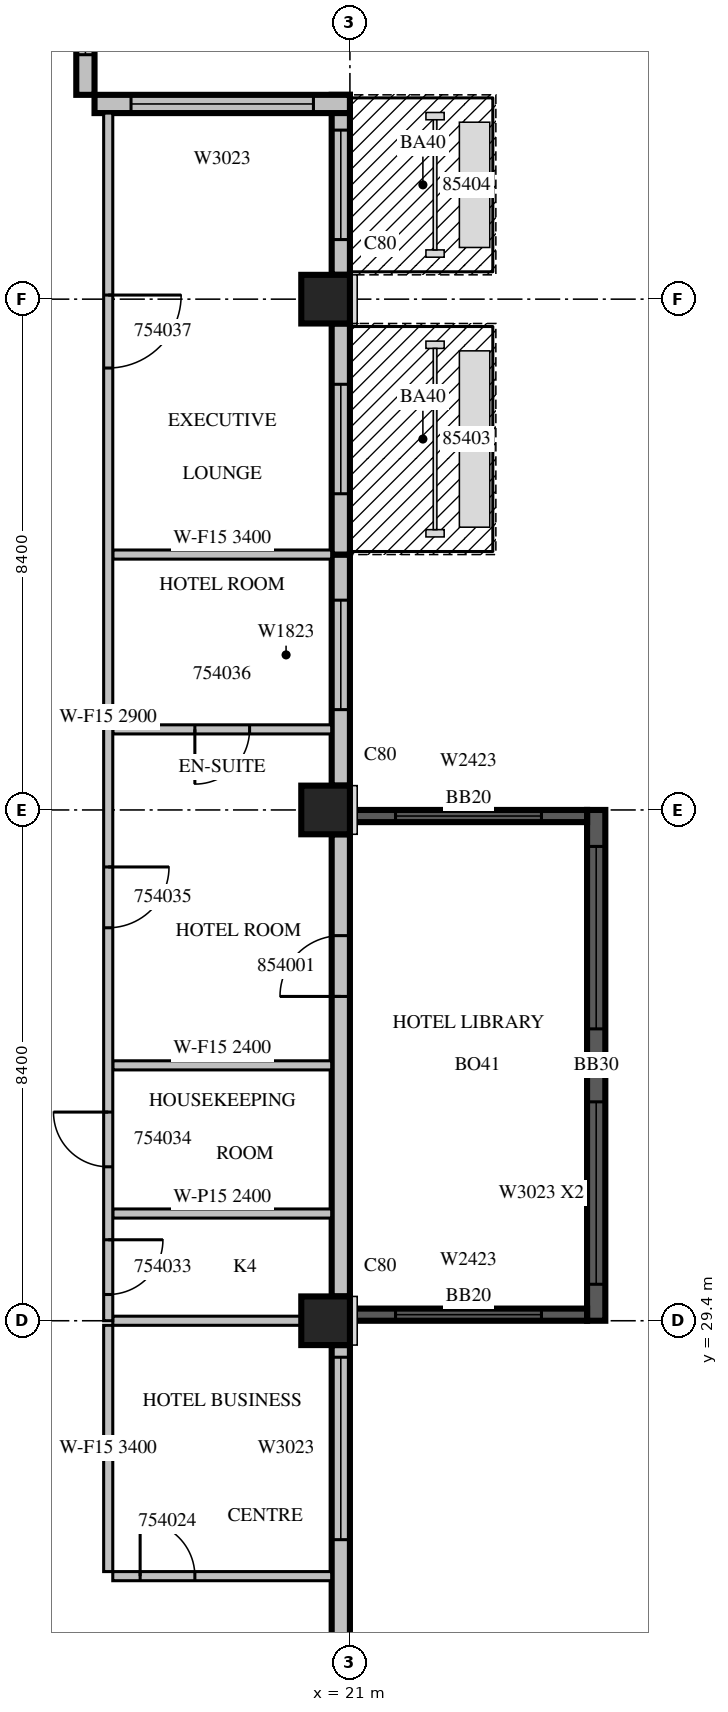
"""IFC4 building model, lengths in metres.
Left out: names, types, materials, properties, quantities, classifications, styles, units other than length and angle.
Written with IfcOpenShell. Run it as: python <this file> out.ifc"""

import sys

from ifc_helpers import new_model, si_unit, direction, frame, frame_2d, origin, origin_2d, place, context, subcontext, project, spatial, rectangle, extrude, source, transform, mapped, element, fill, save


model = new_model("IFC4")
c1 = context("Model", 3, precision=1e-05, world=origin(), true_north=direction((0.0, 1.0)))
c2 = subcontext(c1, "Body", "Model", "MODEL_VIEW")
j1 = project(units=[si_unit("LENGTHUNIT", "METRE"), si_unit("PLANEANGLEUNIT", "RADIAN")], contexts=[c1])
p1 = place(None, origin())
s1 = spatial("IfcSite", under=j1, at=p1, CompositionType="ELEMENT")
p2 = place(p1, origin())
s2 = spatial("IfcBuilding", under=s1, at=p2, CompositionType="ELEMENT")
p3 = place(p2, frame((0.0, 0.0, 238.6)))
s3 = spatial("IfcBuildingStorey", under=s2, at=p3, CompositionType="ELEMENT", Elevation=238.6)
m1 = source(origin(), c2, "Body", "SweptSolid", [
    extrude(rectangle(XDim=0.8, YDim=0.8, at=origin_2d()), origin(), (0.0, 0.0, 1.0), 3.8),
])
for number, where, z_axis, x_axis in (
    (1, (20.6, 29.4, 0.0), (0.0, 0.0, 1.0), (1.0, 0.0, 0.0)),
    (2, (20.6, 37.8, 0.0), (0.0, 0.0, 1.0), (1.0, 0.0, 0.0)),
    (3, (20.6, 46.2, 0.0), (0.0, 0.0, 1.0), (1.0, 0.0, 0.0)),
):
    element("IfcColumn", number, at=place(p3, frame(where, z_axis=z_axis, x_axis=x_axis)), inside=s3, PredefinedType="COLUMN", context=c2, shape_type="MappedRepresentation", body=[
        mapped(m1, transform((0.0, 0.0, 0.0), scale=1.0)),
    ])
m2 = source(origin(), c2, "Body", "SweptSolid", [
    extrude(rectangle(XDim=7.2, YDim=0.3, at=frame_2d((3.6, 0.0))), origin(), (0.0, 0.0, 1.0), 3.4),
])
p4 = place(p3, frame((20.85, 21.8, 0.0), z_axis=(0.0, 0.0, 1.0), x_axis=(0.0, 1.0, 0.0)))
e4 = element("IfcWall", 4, at=p4, inside=s3, PredefinedType="STANDARD", context=c2, shape_type="MappedRepresentation", body=[
    mapped(m2, transform((0.0, 0.0, 0.0), scale=1.0)),
])
m3 = source(origin(), c2, "Body", "SweptSolid", [
    extrude(rectangle(XDim=1.8, YDim=2.3, at=frame_2d((0.9, 1.15))), frame((0.0, 0.16, 0.0), z_axis=(0.0, -1.0, 0.0), x_axis=(1.0, 0.0, 0.0)), (0.0, 0.0, 1.0), 0.32),
])
p5 = place(p4, frame((0.4, 0.0, 0.6)))
e5 = element("IfcOpeningElement", 5, at=p5, cuts=e4, PredefinedType="OPENING", context=c2, shape_type="MappedRepresentation", body=[
    mapped(m3, transform((0.0, 0.0, 0.0), scale=1.0)),
])
m4 = source(origin(), c2, "Body", "SweptSolid", [
    extrude(rectangle(XDim=3.0, YDim=2.3, at=frame_2d((1.5, 1.15))), frame((0.0, 0.16, 0.0), z_axis=(0.0, -1.0, 0.0), x_axis=(1.0, 0.0, 0.0)), (0.0, 0.0, 1.0), 0.32),
])
p6 = place(p4, frame((4.0, 0.0, 0.6)))
e6 = element("IfcOpeningElement", 6, at=p6, cuts=e4, PredefinedType="OPENING", context=c2, shape_type="MappedRepresentation", body=[
    mapped(m4, transform((0.0, 0.0, 0.0), scale=1.0)),
])
m5 = source(origin(), c2, "Body", "SweptSolid", [
    extrude(rectangle(XDim=7.6, YDim=0.3, at=frame_2d((3.8, 0.0))), origin(), (0.0, 0.0, 1.0), 3.4),
])
p7 = place(p3, frame((20.85, 29.8, 0.0), z_axis=(0.0, 0.0, 1.0), x_axis=(0.0, 1.0, 0.0)))
e7 = element("IfcWall", 7, at=p7, inside=s3, PredefinedType="STANDARD", context=c2, shape_type="MappedRepresentation", body=[
    mapped(m5, transform((0.0, 0.0, 0.0), scale=1.0)),
])
m6 = source(origin(), c2, "Body", "SweptSolid", [
    extrude(rectangle(XDim=1.0, YDim=2.1, at=frame_2d((0.5, 1.05))), frame((0.0, 0.16, 0.0), z_axis=(0.0, -1.0, 0.0), x_axis=(1.0, 0.0, 0.0)), (0.0, 0.0, 1.0), 0.32),
])
p8 = place(p7, frame((4.933, 0.0, 0.0)))
e8 = element("IfcOpeningElement", 8, at=p8, cuts=e7, PredefinedType="OPENING", context=c2, shape_type="MappedRepresentation", body=[
    mapped(m6, transform((0.0, 0.0, 0.0), scale=1.0)),
])
p9 = place(p3, frame((20.85, 38.2, 0.0), z_axis=(0.0, 0.0, 1.0), x_axis=(0.0, 1.0, 0.0)))
e9 = element("IfcWall", 9, at=p9, inside=s3, PredefinedType="STANDARD", context=c2, shape_type="SweptSolid", body=[
    extrude(rectangle(XDim=3.8, YDim=0.3, at=frame_2d((1.9, 0.0))), origin(), (0.0, 0.0, 1.0), 3.4),
])
p10 = place(p9, frame((1.25, 0.0, 0.6)))
e10 = element("IfcOpeningElement", 10, at=p10, cuts=e9, PredefinedType="OPENING", context=c2, shape_type="MappedRepresentation", body=[
    mapped(m3, transform((0.0, 0.0, 0.0), scale=1.0)),
])
m7 = source(origin(), c2, "Body", "SweptSolid", [
    extrude(rectangle(XDim=3.8, YDim=0.3, at=frame_2d((1.9, 0.0))), origin(), (0.0, 0.0, 1.0), 3.4),
])
p11 = place(p3, frame((20.85, 42.0, 0.0), z_axis=(0.0, 0.0, 1.0), x_axis=(0.0, 1.0, 0.0)))
e11 = element("IfcWall", 11, at=p11, inside=s3, PredefinedType="STANDARD", context=c2, shape_type="MappedRepresentation", body=[
    mapped(m7, transform((0.0, 0.0, 0.0), scale=1.0)),
])
m8 = source(origin(), c2, "Body", "SweptSolid", [
    extrude(rectangle(XDim=1.8, YDim=2.4, at=frame_2d((0.9, 1.2))), frame((0.0, 0.16, 0.0), z_axis=(0.0, -1.0, 0.0), x_axis=(1.0, 0.0, 0.0)), (0.0, 0.0, 1.0), 0.32),
])
p12 = place(p11, frame((1.0, 0.0, 0.0)))
e12 = element("IfcOpeningElement", 12, at=p12, cuts=e11, PredefinedType="OPENING", context=c2, shape_type="MappedRepresentation", body=[
    mapped(m8, transform((0.0, 0.0, 0.0), scale=1.0)),
])
m9 = source(origin(), c2, "Body", "SweptSolid", [
    extrude(rectangle(XDim=2.96, YDim=0.3, at=frame_2d((1.48, 0.0))), origin(), (0.0, 0.0, 1.0), 3.4),
])
p13 = place(p3, frame((20.85, 46.6, 0.0), z_axis=(0.0, 0.0, 1.0), x_axis=(0.0, 1.0, 0.0)))
e13 = element("IfcWall", 13, at=p13, inside=s3, PredefinedType="STANDARD", context=c2, shape_type="MappedRepresentation", body=[
    mapped(m9, transform((0.0, 0.0, 0.0), scale=1.0)),
])
p14 = place(p13, frame((0.58, 0.0, 0.0)))
e14 = element("IfcOpeningElement", 14, at=p14, cuts=e13, PredefinedType="OPENING", context=c2, shape_type="MappedRepresentation", body=[
    mapped(m8, transform((0.0, 0.0, 0.0), scale=1.0)),
])
m10 = source(origin(), c2, "Body", "SweptSolid", [
    extrude(rectangle(XDim=4.2, YDim=0.3, at=frame_2d((2.1, 0.0))), origin(), (0.0, 0.0, 1.0), 3.4),
])
p15 = place(p3, frame((21.0, 49.41, 0.0), z_axis=(0.0, 0.0, 1.0), x_axis=(-1.0, 0.0, 0.0)))
e15 = element("IfcWall", 15, at=p15, inside=s3, PredefinedType="STANDARD", context=c2, shape_type="MappedRepresentation", body=[
    mapped(m10, transform((0.0, 0.0, 0.0), scale=1.0)),
])
p16 = place(p15, frame((0.6, 0.0, 0.6)))
e16 = element("IfcOpeningElement", 16, at=p16, cuts=e15, PredefinedType="OPENING", context=c2, shape_type="MappedRepresentation", body=[
    mapped(m4, transform((0.0, 0.0, 0.0), scale=1.0)),
])
m11 = source(origin(), c2, "Body", "SweptSolid", [
    extrude(rectangle(XDim=2.52, YDim=0.3, at=frame_2d((1.26, 0.0))), origin(), (0.0, 0.0, 1.0), 3.4),
])
p17 = place(p3, frame((16.65, 49.56, 0.0), z_axis=(0.0, 0.0, 1.0), x_axis=(0.0, 1.0, 0.0)))
e17 = element("IfcWall", 17, at=p17, inside=s3, PredefinedType="STANDARD", context=c2, shape_type="MappedRepresentation", body=[
    mapped(m11, transform((0.0, 0.0, 0.0), scale=1.0)),
])
m12 = source(origin(), c2, "Body", "SweptSolid", [
    extrude(rectangle(XDim=1.2, YDim=2.3, at=frame_2d((0.6, 1.15))), frame((0.0, 0.16, 0.0), z_axis=(0.0, -1.0, 0.0), x_axis=(1.0, 0.0, 0.0)), (0.0, 0.0, 1.0), 0.32),
])
p18 = place(p17, frame((0.66, 0.0, 0.6)))
e18 = element("IfcOpeningElement", 18, at=p18, cuts=e17, PredefinedType="OPENING", context=c2, shape_type="MappedRepresentation", body=[
    mapped(m12, transform((0.0, 0.0, 0.0), scale=1.0)),
])
m13 = source(origin(), c2, "Body", "SweptSolid", [
    extrude(rectangle(XDim=8.4, YDim=0.3, at=frame_2d((4.2, 0.0))), origin(), (0.0, 0.0, 1.0), 3.39),
])
p19 = place(p3, frame((25.05, 29.4, 0.0), z_axis=(0.0, 0.0, 1.0), x_axis=(0.0, 1.0, 0.0)))
e19 = element("IfcWall", 19, at=p19, inside=s3, PredefinedType="SOLIDWALL", context=c2, shape_type="MappedRepresentation", body=[
    mapped(m13, transform((0.0, 0.0, 0.0), scale=1.0)),
])
p20 = place(p19, frame((0.6, 0.0, 0.6)))
e20 = element("IfcOpeningElement", 20, at=p20, cuts=e19, PredefinedType="OPENING", context=c2, shape_type="MappedRepresentation", body=[
    mapped(m4, transform((0.0, 0.0, 0.0), scale=1.0)),
])
p21 = place(p19, frame((4.8, 0.0, 0.6)))
e21 = element("IfcOpeningElement", 21, at=p21, cuts=e19, PredefinedType="OPENING", context=c2, shape_type="MappedRepresentation", body=[
    mapped(m4, transform((0.0, 0.0, 0.0), scale=1.0)),
])
m14 = source(origin(), c2, "Body", "SweptSolid", [
    extrude(rectangle(XDim=3.9, YDim=0.2, at=frame_2d((1.95, 0.0))), origin(), (0.0, 0.0, 1.0), 3.39),
])
p22 = place(p3, frame((21.0, 29.5, 0.0), z_axis=(0.0, 0.0, 1.0), x_axis=(1.0, 0.0, 0.0)))
e22 = element("IfcWall", 22, at=p22, inside=s3, PredefinedType="SOLIDWALL", context=c2, shape_type="MappedRepresentation", body=[
    mapped(m14, transform((0.0, 0.0, 0.0), scale=1.0)),
])
m15 = source(origin(), c2, "Body", "SweptSolid", [
    extrude(rectangle(XDim=2.4, YDim=2.3, at=frame_2d((1.2, 1.15))), frame((0.0, 0.11, 0.0), z_axis=(0.0, -1.0, 0.0), x_axis=(1.0, 0.0, 0.0)), (0.0, 0.0, 1.0), 0.22),
])
p23 = place(p22, frame((0.75, 0.0, 0.6)))
e23 = element("IfcOpeningElement", 23, at=p23, cuts=e22, PredefinedType="OPENING", context=c2, shape_type="MappedRepresentation", body=[
    mapped(m15, transform((0.0, 0.0, 0.0), scale=1.0)),
])
p24 = place(p3, frame((21.0, 37.7, 0.0), z_axis=(0.0, 0.0, 1.0), x_axis=(1.0, 0.0, 0.0)))
e24 = element("IfcWall", 24, at=p24, inside=s3, PredefinedType="SOLIDWALL", context=c2, shape_type="MappedRepresentation", body=[
    mapped(m14, transform((0.0, 0.0, 0.0), scale=1.0)),
])
p25 = place(p24, frame((0.75, 0.0, 0.6)))
e25 = element("IfcOpeningElement", 25, at=p25, cuts=e24, PredefinedType="OPENING", context=c2, shape_type="MappedRepresentation", body=[
    mapped(m15, transform((0.0, 0.0, 0.0), scale=1.0)),
])
m16 = source(origin(), c2, "Body", "SweptSolid", [
    extrude(rectangle(XDim=3.6, YDim=0.15, at=frame_2d((1.8, 0.0))), origin(), (0.0, 0.0, 1.0), 3.4),
])
p26 = place(p3, frame((17.1, 25.2, 0.0), z_axis=(0.0, 0.0, 1.0), x_axis=(1.0, 0.0, 0.0)))
e26 = element("IfcWall", 26, at=p26, inside=s3, PredefinedType="PARTITIONING", context=c2, shape_type="MappedRepresentation", body=[
    mapped(m16, transform((0.0, 0.0, 0.0), scale=1.0)),
])
m17 = source(origin(), c2, "Body", "SweptSolid", [
    extrude(rectangle(XDim=0.9, YDim=2.1, at=frame_2d((0.45, 1.05))), frame((0.0, 0.085, 0.0), z_axis=(0.0, -1.0, 0.0), x_axis=(1.0, 0.0, 0.0)), (0.0, 0.0, 1.0), 0.17),
])
p27 = place(p26, frame((0.45, 0.0, 0.0)))
e27 = element("IfcOpeningElement", 27, at=p27, cuts=e26, PredefinedType="OPENING", context=c2, shape_type="MappedRepresentation", body=[
    mapped(m17, transform((0.0, 0.0, 0.0), scale=1.0)),
])
m18 = source(origin(), c2, "Body", "SweptSolid", [
    extrude(rectangle(XDim=4.05, YDim=0.15, at=frame_2d((2.025, 0.0))), origin(), (0.0, 0.0, 1.0), 3.4),
])
p28 = place(p3, frame((17.025, 29.325, 0.0), z_axis=(0.0, 0.0, 1.0), x_axis=(0.0, -1.0, 0.0)))
e28 = element("IfcWall", 28, at=p28, inside=s3, PredefinedType="PARTITIONING", context=c2, shape_type="MappedRepresentation", body=[
    mapped(m18, transform((0.0, 0.0, 0.0), scale=1.0)),
])
m19 = source(origin(), c2, "Body", "SweptSolid", [
    extrude(rectangle(XDim=3.101, YDim=0.15, at=frame_2d((1.55, 0.0))), origin(), (0.0, 0.0, 1.0), 3.4),
])
p29 = place(p3, frame((20.201, 29.4, 0.0), z_axis=(0.0, 0.0, 1.0), x_axis=(-1.0, 0.0, 0.0)))
e29 = element("IfcWall", 29, at=p29, inside=s3, PredefinedType="PARTITIONING", context=c2, shape_type="MappedRepresentation", body=[
    mapped(m19, transform((0.0, 0.0, 0.0), scale=1.0)),
])
m20 = source(origin(), c2, "Body", "SweptSolid", [
    extrude(rectangle(XDim=3.6, YDim=0.15, at=frame_2d((1.8, 0.0))), origin(), (0.0, 0.0, 1.0), 2.4),
])
p30 = place(p3, frame((17.1, 31.163, 0.0), z_axis=(0.0, 0.0, 1.0), x_axis=(1.0, 0.0, 0.0)))
e30 = element("IfcWall", 30, at=p30, inside=s3, PredefinedType="PARTITIONING", context=c2, shape_type="MappedRepresentation", body=[
    mapped(m20, transform((0.0, 0.0, 0.0), scale=1.0)),
])
p31 = place(p3, frame((17.1, 39.125, 0.0), z_axis=(0.0, 0.0, 1.0), x_axis=(1.0, 0.0, 0.0)))
e31 = element("IfcWall", 31, at=p31, inside=s3, PredefinedType="PARTITIONING", context=c2, shape_type="MappedRepresentation", body=[
    mapped(m16, transform((0.0, 0.0, 0.0), scale=1.0)),
])
p32 = place(p31, frame((1.35, 0.0, 0.0)))
e32 = element("IfcOpeningElement", 32, at=p32, cuts=e31, PredefinedType="OPENING", context=c2, shape_type="MappedRepresentation", body=[
    mapped(m17, transform((0.0, 0.0, 0.0), scale=1.0)),
])
p33 = place(p3, frame((20.7, 33.6, 0.0), z_axis=(0.0, 0.0, 1.0), x_axis=(-1.0, 0.0, 0.0)))
e33 = element("IfcWall", 33, at=p33, inside=s3, PredefinedType="PARTITIONING", context=c2, shape_type="MappedRepresentation", body=[
    mapped(m20, transform((0.0, 0.0, 0.0), scale=1.0)),
])
p34 = place(p3, frame((20.7, 42.0, 0.0), z_axis=(0.0, 0.0, 1.0), x_axis=(-1.0, 0.0, 0.0)))
e34 = element("IfcWall", 34, at=p34, inside=s3, PredefinedType="PARTITIONING", context=c2, shape_type="MappedRepresentation", body=[
    mapped(m16, transform((0.0, 0.0, 0.0), scale=1.0)),
])
m21 = source(origin(), c2, "Body", "SweptSolid", [
    extrude(rectangle(XDim=19.86, YDim=0.15, at=frame_2d((9.93, 0.0))), origin(), (0.0, 0.0, 1.0), 2.9),
])
p35 = place(p3, frame((17.025, 49.26, 0.0), z_axis=(0.0, 0.0, 1.0), x_axis=(0.0, -1.0, 0.0)))
e35 = element("IfcWall", 35, at=p35, inside=s3, PredefinedType="PARTITIONING", context=c2, shape_type="MappedRepresentation", body=[
    mapped(m21, transform((0.0, 0.0, 0.0), scale=1.0)),
])
p36 = place(p35, frame((18.528, 0.0, 0.0)))
e36 = element("IfcOpeningElement", 36, at=p36, cuts=e35, PredefinedType="OPENING", context=c2, shape_type="MappedRepresentation", body=[
    mapped(m17, transform((0.0, 0.0, 0.0), scale=1.0)),
])
p37 = place(p35, frame((16.428, 0.0, 0.0)))
e37 = element("IfcOpeningElement", 37, at=p37, cuts=e35, PredefinedType="OPENING", context=c2, shape_type="MappedRepresentation", body=[
    mapped(m17, transform((0.0, 0.0, 0.0), scale=1.0)),
])
m22 = source(origin(), c2, "Body", "SweptSolid", [
    extrude(rectangle(XDim=1.0, YDim=2.1, at=frame_2d((0.5, 1.05))), frame((0.0, 0.085, 0.0), z_axis=(0.0, -1.0, 0.0), x_axis=(1.0, 0.0, 0.0)), (0.0, 0.0, 1.0), 0.17),
])
p38 = place(p35, frame((12.398, 0.0, 0.0)))
e38 = element("IfcOpeningElement", 38, at=p38, cuts=e35, PredefinedType="OPENING", context=c2, shape_type="MappedRepresentation", body=[
    mapped(m22, transform((0.0, 0.0, 0.0), scale=1.0)),
])
m23 = source(origin(), c2, "Body", "SweptSolid", [
    extrude(rectangle(XDim=1.2, YDim=2.1, at=frame_2d((0.6, 1.05))), frame((0.0, 0.085, 0.0), z_axis=(0.0, -1.0, 0.0), x_axis=(1.0, 0.0, 0.0)), (0.0, 0.0, 1.0), 0.17),
])
p39 = place(p35, frame((2.993, 0.0, 0.0)))
e39 = element("IfcOpeningElement", 39, at=p39, cuts=e35, PredefinedType="OPENING", context=c2, shape_type="MappedRepresentation", body=[
    mapped(m23, transform((0.0, 0.0, 0.0), scale=1.0)),
])
m24 = source(origin(), c2, "Body", "SweptSolid", [
    extrude(rectangle(XDim=3.0, YDim=2.3, at=frame_2d((1.5, 1.15))), frame((0.0, 0.03, 0.0), z_axis=(0.0, -1.0, 0.0), x_axis=(1.0, 0.0, 0.0)), (0.0, 0.0, 1.0), 0.06),
])
p40 = place(p6, origin())
e40 = element("IfcWindow", 40, at=p40, inside=s3, PartitioningType="SINGLE_PANEL", PredefinedType="WINDOW", context=c2, shape_type="MappedRepresentation", body=[
    mapped(m24, transform((0.0, 0.0, 0.0), scale=1.0)),
])
fill(e6, e40)
m25 = source(origin(), c2, "Body", "SweptSolid", [
    extrude(rectangle(XDim=1.8, YDim=2.3, at=frame_2d((0.9, 1.15))), frame((0.0, 0.03, 0.0), z_axis=(0.0, -1.0, 0.0), x_axis=(1.0, 0.0, 0.0)), (0.0, 0.0, 1.0), 0.06),
])
p41 = place(p10, origin())
e41 = element("IfcWindow", 41, at=p41, inside=s3, PartitioningType="SINGLE_PANEL", PredefinedType="WINDOW", context=c2, shape_type="MappedRepresentation", body=[
    mapped(m25, transform((0.0, 0.0, 0.0), scale=1.0)),
])
fill(e10, e41)
m26 = source(origin(), c2, "Body", "SweptSolid", [
    extrude(rectangle(XDim=1.8, YDim=2.4, at=frame_2d((0.9, 1.2))), frame((0.0, 0.025, 0.0), z_axis=(0.0, -1.0, 0.0), x_axis=(1.0, 0.0, 0.0)), (0.0, 0.0, 1.0), 0.05),
])
p42 = place(p12, origin())
e42 = element("IfcDoor", 42, at=p42, inside=s3, OperationType="SLIDING_TO_LEFT", PredefinedType="DOOR", context=c2, shape_type="MappedRepresentation", body=[
    mapped(m26, transform((0.0, 0.0, 0.0), scale=1.0)),
])
fill(e12, e42)
p43 = place(p14, origin())
e43 = element("IfcDoor", 43, at=p43, inside=s3, OperationType="SLIDING_TO_LEFT", PredefinedType="DOOR", context=c2, shape_type="MappedRepresentation", body=[
    mapped(m26, transform((0.0, 0.0, 0.0), scale=1.0)),
])
fill(e14, e43)
p44 = place(p16, origin())
e44 = element("IfcWindow", 44, at=p44, inside=s3, PartitioningType="SINGLE_PANEL", PredefinedType="WINDOW", context=c2, shape_type="MappedRepresentation", body=[
    mapped(m24, transform((0.0, 0.0, 0.0), scale=1.0)),
])
fill(e16, e44)
m27 = source(origin(), c2, "Body", "SweptSolid", [
    extrude(rectangle(XDim=1.2, YDim=2.3, at=frame_2d((0.6, 1.15))), frame((0.0, 0.03, 0.0), z_axis=(0.0, -1.0, 0.0), x_axis=(1.0, 0.0, 0.0)), (0.0, 0.0, 1.0), 0.06),
])
p45 = place(p18, origin())
e45 = element("IfcWindow", 45, at=p45, inside=s3, PartitioningType="SINGLE_PANEL", PredefinedType="WINDOW", context=c2, shape_type="MappedRepresentation", body=[
    mapped(m27, transform((0.0, 0.0, 0.0), scale=1.0)),
])
fill(e18, e45)
p46 = place(p20, origin())
e46 = element("IfcWindow", 46, at=p46, inside=s3, PartitioningType="SINGLE_PANEL", PredefinedType="WINDOW", context=c2, shape_type="MappedRepresentation", body=[
    mapped(m24, transform((0.0, 0.0, 0.0), scale=1.0)),
])
fill(e20, e46)
p47 = place(p21, origin())
e47 = element("IfcWindow", 47, at=p47, inside=s3, PartitioningType="SINGLE_PANEL", PredefinedType="WINDOW", context=c2, shape_type="MappedRepresentation", body=[
    mapped(m24, transform((0.0, 0.0, 0.0), scale=1.0)),
])
fill(e21, e47)
m28 = source(origin(), c2, "Body", "SweptSolid", [
    extrude(rectangle(XDim=2.4, YDim=2.3, at=frame_2d((1.2, 1.15))), frame((0.0, 0.03, 0.0), z_axis=(0.0, -1.0, 0.0), x_axis=(1.0, 0.0, 0.0)), (0.0, 0.0, 1.0), 0.06),
])
p48 = place(p23, origin())
e48 = element("IfcWindow", 48, at=p48, inside=s3, PartitioningType="SINGLE_PANEL", PredefinedType="WINDOW", context=c2, shape_type="MappedRepresentation", body=[
    mapped(m28, transform((0.0, 0.0, 0.0), scale=1.0)),
])
fill(e23, e48)
p49 = place(p25, origin())
e49 = element("IfcWindow", 49, at=p49, inside=s3, PartitioningType="SINGLE_PANEL", PredefinedType="WINDOW", context=c2, shape_type="MappedRepresentation", body=[
    mapped(m28, transform((0.0, 0.0, 0.0), scale=1.0)),
])
fill(e25, e49)
m29 = source(origin(), c2, "Body", "SweptSolid", [
    extrude(rectangle(XDim=0.9, YDim=2.1, at=frame_2d((0.45, 1.05))), frame((0.0, 0.025, 0.0), z_axis=(0.0, -1.0, 0.0), x_axis=(1.0, 0.0, 0.0)), (0.0, 0.0, 1.0), 0.05),
])
p50 = place(p27, origin())
e50 = element("IfcDoor", 50, at=p50, inside=s3, OperationType="SINGLE_SWING_LEFT", PredefinedType="DOOR", context=c2, shape_type="MappedRepresentation", body=[
    mapped(m29, transform((0.0, 0.0, 0.0), scale=1.0)),
])
fill(e27, e50)
p51 = place(p36, origin())
e51 = element("IfcDoor", 51, at=p51, inside=s3, OperationType="SINGLE_SWING_LEFT", PredefinedType="DOOR", context=c2, shape_type="MappedRepresentation", body=[
    mapped(m29, transform((0.0, 0.0, 0.0), scale=1.0)),
])
fill(e36, e51)
p52 = place(p37, origin())
e52 = element("IfcDoor", 52, at=p52, inside=s3, OperationType="SINGLE_SWING_RIGHT", PredefinedType="DOOR", context=c2, shape_type="MappedRepresentation", body=[
    mapped(m29, transform((0.0, 0.0, 0.0), scale=1.0)),
])
fill(e37, e52)
m30 = source(origin(), c2, "Body", "SweptSolid", [
    extrude(rectangle(XDim=1.0, YDim=2.1, at=frame_2d((0.5, 1.05))), frame((0.0, 0.025, 0.0), z_axis=(0.0, -1.0, 0.0), x_axis=(1.0, 0.0, 0.0)), (0.0, 0.0, 1.0), 0.05),
])
p53 = place(p38, origin())
e53 = element("IfcDoor", 53, at=p53, inside=s3, OperationType="SINGLE_SWING_LEFT", PredefinedType="DOOR", context=c2, shape_type="MappedRepresentation", body=[
    mapped(m30, transform((0.0, 0.0, 0.0), scale=1.0)),
])
fill(e38, e53)
p54 = place(p32, origin())
e54 = element("IfcDoor", 54, at=p54, inside=s3, OperationType="SINGLE_SWING_RIGHT", PredefinedType="DOOR", context=c2, shape_type="MappedRepresentation", body=[
    mapped(m29, transform((0.0, 0.0, 0.0), scale=1.0)),
])
fill(e32, e54)
m31 = source(origin(), c2, "Body", "SweptSolid", [
    extrude(rectangle(XDim=1.2, YDim=2.1, at=frame_2d((0.6, 1.05))), frame((0.0, 0.025, 0.0), z_axis=(0.0, -1.0, 0.0), x_axis=(1.0, 0.0, 0.0)), (0.0, 0.0, 1.0), 0.05),
])
p55 = place(p39, origin())
e55 = element("IfcDoor", 55, at=p55, inside=s3, OperationType="SINGLE_SWING_LEFT", PredefinedType="DOOR", context=c2, shape_type="MappedRepresentation", body=[
    mapped(m31, transform((0.0, 0.0, 0.0), scale=1.0)),
])
fill(e39, e55)
p56 = place(p8, origin())
e56 = element("IfcDoor", 56, at=p56, inside=s3, OperationType="SINGLE_SWING_LEFT", PredefinedType="DOOR", context=c2, shape_type="MappedRepresentation", body=[
    mapped(m30, transform((0.0, 0.0, 0.0), scale=1.0)),
])
fill(e8, e56)
save(model, sys.argv[1])
